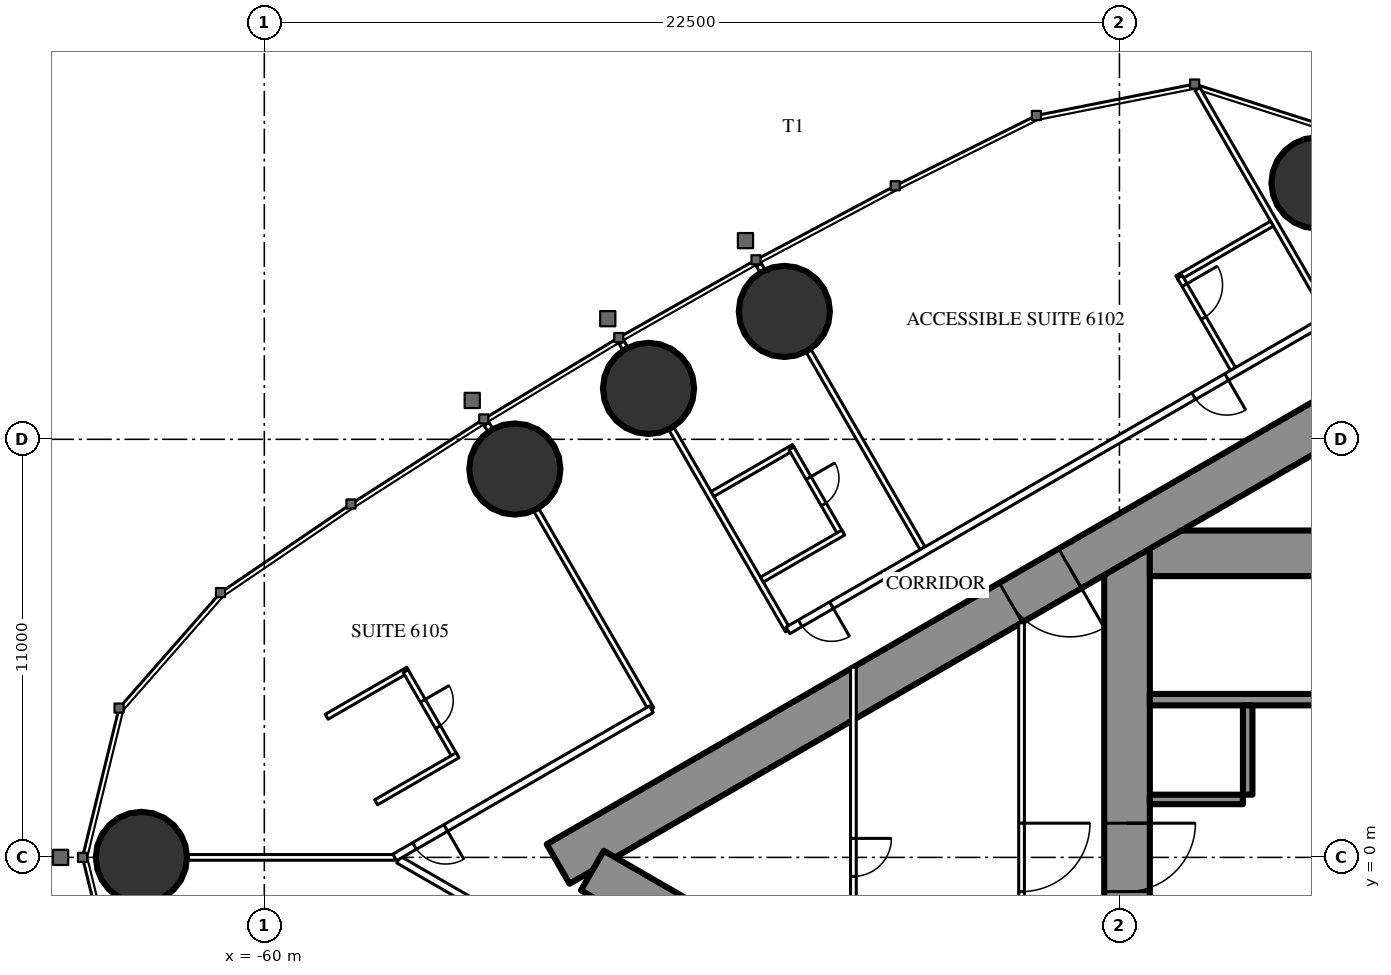
"""IFC4 building model, lengths in metres.
Left out: names, types, materials, properties, quantities, classifications, styles, units other than length and angle.
Written with IfcOpenShell. Run it as: python <this file> out.ifc"""

import sys

from ifc_helpers import new_model, si_unit, direction, frame, frame_2d, origin, origin_2d, place, context, subcontext, project, spatial, rectangle, circle, extrude, element, fill, save


model = new_model("IFC4")
c1 = context("Model", 3, precision=1e-05, world=origin(), true_north=direction((0.0, 1.0)))
c2 = subcontext(c1, "Body", "Model", "MODEL_VIEW")
j1 = project(units=[si_unit("LENGTHUNIT", "METRE"), si_unit("PLANEANGLEUNIT", "RADIAN")], contexts=[c1])
p1 = place(None, origin())
s1 = spatial("IfcSite", under=j1, at=p1, CompositionType="ELEMENT")
p2 = place(p1, origin())
s2 = spatial("IfcBuilding", under=s1, at=p2, CompositionType="ELEMENT")
p3 = place(p2, frame((0.0, 0.0, 229.7)))
s3 = spatial("IfcBuildingStorey", under=s2, at=p3, CompositionType="ELEMENT", Elevation=229.7)
for number, where, z_axis, x_axis in (
    (1, (-63.234, 0.0, 0.0), (0.0, 0.0, 1.0), (1.0, 0.0, 0.0)),
    (2, (-32.301, 17.745, 0.0), (0.0, 0.0, 1.0), (1.0, 0.0, 0.0)),
    (3, (-46.317, 14.365, 0.0), (0.0, 0.0, 1.0), (1.0, 0.0, 0.0)),
    (4, (-49.89, 12.34, 0.0), (0.0, 0.0, 1.0), (1.0, 0.0, 0.0)),
    (5, (-53.408, 10.219, 0.0), (0.0, 0.0, 1.0), (1.0, 0.0, 0.0)),
):
    element("IfcColumn", number, at=place(p3, frame(where, z_axis=z_axis, x_axis=x_axis)), inside=s3, PredefinedType="COLUMN", context=c2, shape_type="SweptSolid", body=[
        extrude(circle(Radius=1.2, at=origin_2d()), origin(), (0.0, 0.0, 1.0), 3.6),
    ])
p4 = place(p3, frame((-37.3, 8.6, 0.0), z_axis=(0.0, 0.0, 1.0), x_axis=(0.0, -1.0, 0.0)))
e6 = element("IfcWall", 6, at=p4, inside=s3, PredefinedType="SHEAR", context=c2, shape_type="SweptSolid", body=[
    extrude(rectangle(XDim=17.2, YDim=1.2, at=frame_2d((8.6, 0.0))), origin(), (0.0, 0.0, 1.0), 3.6),
])
p5 = place(p4, frame((7.7, 0.0, 0.0)))
e7 = element("IfcOpeningElement", 7, at=p5, cuts=e6, PredefinedType="OPENING", context=c2, shape_type="SweptSolid", body=[
    extrude(rectangle(XDim=1.8, YDim=2.2, at=frame_2d((0.9, 1.1))), frame((0.0, 0.61, 0.0), z_axis=(0.0, -1.0, 0.0), x_axis=(1.0, 0.0, 0.0)), (0.0, 0.0, 1.0), 1.22),
])
p6 = place(p3, frame((-28.3, 8.0, 0.0), z_axis=(0.0, 0.0, 1.0), x_axis=(-1.0, 0.0, 0.0)))
e8 = element("IfcWall", 8, at=p6, inside=s3, PredefinedType="SHEAR", context=c2, shape_type="SweptSolid", body=[
    extrude(rectangle(XDim=8.4, YDim=1.2, at=frame_2d((4.2, 0.0))), origin(), (0.0, 0.0, 1.0), 3.6),
])
p7 = place(p6, frame((0.25, 0.0, 0.0)))
e9 = element("IfcOpeningElement", 9, at=p7, cuts=e8, PredefinedType="OPENING", context=c2, shape_type="SweptSolid", body=[
    extrude(rectangle(XDim=1.0, YDim=2.2, at=frame_2d((0.5, 1.1))), frame((0.0, 0.61, 0.0), z_axis=(0.0, -1.0, 0.0), x_axis=(1.0, 0.0, 0.0)), (0.0, 0.0, 1.0), 1.22),
])
p8 = place(p3, frame((-28.3, 4.15, 0.0), z_axis=(0.0, 0.0, 1.0), x_axis=(-1.0, 0.0, 0.0)))
e10 = element("IfcWall", 10, at=p8, inside=s3, PredefinedType="SHEAR", context=c2, shape_type="SweptSolid", body=[
    extrude(rectangle(XDim=8.4, YDim=0.3, at=frame_2d((4.2, 0.0))), origin(), (0.0, 0.0, 1.0), 3.6),
])
p9 = place(p3, frame((-34.125, 4.0, 0.0), z_axis=(0.0, 0.0, 1.0), x_axis=(0.0, -1.0, 0.0)))
e11 = element("IfcWall", 11, at=p9, inside=s3, PredefinedType="SHEAR", context=c2, shape_type="SweptSolid", body=[
    extrude(rectangle(XDim=2.35, YDim=0.25, at=frame_2d((1.175, 0.0))), origin(), (0.0, 0.0, 1.0), 3.6),
])
p10 = place(p3, frame((-34.25, 1.525, 0.0), z_axis=(0.0, 0.0, 1.0), x_axis=(-1.0, 0.0, 0.0)))
e12 = element("IfcWall", 12, at=p10, inside=s3, PredefinedType="SHEAR", context=c2, shape_type="SweptSolid", body=[
    extrude(rectangle(XDim=2.45, YDim=0.25, at=frame_2d((1.225, 0.0))), origin(), (0.0, 0.0, 1.0), 3.6),
])
p11 = place(p3, frame((-27.2, 14.3, 0.0), z_axis=(0.0, 0.0, 1.0), x_axis=(-0.866026593062, -0.499997940104, 0.0)))
e13 = element("IfcWall", 13, at=p11, inside=s3, PredefinedType="SHEAR", context=c2, shape_type="SweptSolid", body=[
    extrude(rectangle(XDim=28.946, YDim=1.2, at=frame_2d((14.473, 0.0))), origin(), (0.0, 0.0, 1.0), 3.6),
])
p12 = place(p11, frame((4.6, 0.0, 0.0)))
e14 = element("IfcOpeningElement", 14, at=p12, cuts=e13, PredefinedType="OPENING", context=c2, shape_type="SweptSolid", body=[
    extrude(rectangle(XDim=1.0, YDim=2.2, at=frame_2d((0.5, 1.1))), frame((0.0, 0.61, 0.0), z_axis=(0.0, -1.0, 0.0), x_axis=(1.0, 0.0, 0.0)), (0.0, 0.0, 1.0), 1.22),
])
p13 = place(p11, frame((13.395, 0.0, 0.0)))
e15 = element("IfcOpeningElement", 15, at=p13, cuts=e13, PredefinedType="OPENING", context=c2, shape_type="SweptSolid", body=[
    extrude(rectangle(XDim=1.8, YDim=2.2, at=frame_2d((0.9, 1.1))), frame((0.0, 0.61, 0.0), z_axis=(0.0, -1.0, 0.0), x_axis=(1.0, 0.0, 0.0)), (0.0, 0.0, 1.0), 1.22),
])
p14 = place(p3, frame((-27.2, -14.3, 0.0), z_axis=(0.0, 0.0, 1.0), x_axis=(-0.866024021859, 0.500002393557, 0.0)))
e16 = element("IfcWall", 16, at=p14, inside=s3, PredefinedType="SHEAR", context=c2, shape_type="SweptSolid", body=[
    extrude(rectangle(XDim=27.907, YDim=1.2, at=frame_2d((13.954, 0.0))), origin(), (0.0, 0.0, 1.0), 3.6),
])
p15 = place(p14, frame((4.6, 0.0, 0.0)))
e17 = element("IfcOpeningElement", 17, at=p15, cuts=e16, PredefinedType="OPENING", context=c2, shape_type="SweptSolid", body=[
    extrude(rectangle(XDim=1.0, YDim=2.2, at=frame_2d((0.5, 1.1))), frame((0.0, 0.61, 0.0), z_axis=(0.0, -1.0, 0.0), x_axis=(1.0, 0.0, 0.0)), (0.0, 0.0, 1.0), 1.22),
])
p16 = place(p14, frame((13.395, 0.0, 0.0)))
e18 = element("IfcOpeningElement", 18, at=p16, cuts=e16, PredefinedType="OPENING", context=c2, shape_type="SweptSolid", body=[
    extrude(rectangle(XDim=1.8, YDim=2.2, at=frame_2d((0.9, 1.1))), frame((0.0, 0.61, 0.0), z_axis=(0.0, -1.0, 0.0), x_axis=(1.0, 0.0, 0.0)), (0.0, 0.0, 1.0), 1.22),
])
p17 = place(p3, frame((-32.022, 14.287, 0.0), z_axis=(0.0, 0.0, 1.0), x_axis=(-0.50000019414, 0.866025291697, 0.0)))
e19 = element("IfcWall", 19, at=p17, inside=s3, PredefinedType="PARTITIONING", context=c2, shape_type="SweptSolid", body=[
    extrude(rectangle(XDim=6.848, YDim=0.15, at=frame_2d((3.424, 0.0))), origin(), (0.0, 0.0, 1.0), 3.35),
])
p18 = place(p3, frame((-42.68, 8.134, 0.0), z_axis=(0.0, 0.0, 1.0), x_axis=(-0.499984479505, 0.866034364361, 0.0)))
e20 = element("IfcWall", 20, at=p18, inside=s3, PredefinedType="PARTITIONING", context=c2, shape_type="SweptSolid", body=[
    extrude(rectangle(XDim=5.995, YDim=0.15, at=frame_2d((2.998, 0.0))), origin(), (0.0, 0.0, 1.0), 2.45),
])
p19 = place(p3, frame((-46.898, 15.439, 0.0), z_axis=(0.0, 0.0, 1.0), x_axis=(-0.500232303069, 0.865891241997, 0.0)))
e21 = element("IfcWall", 21, at=p19, inside=s3, PredefinedType="PARTITIONING", context=c2, shape_type="SweptSolid", body=[
    extrude(rectangle(XDim=0.18, YDim=0.15, at=frame_2d((0.09, 0.0))), origin(), (0.0, 0.0, 1.0), 2.45),
])
p20 = place(p3, frame((-46.224, 5.972, 0.0), z_axis=(0.0, 0.0, 1.0), x_axis=(-0.500021351822, 0.866013075953, 0.0)))
e22 = element("IfcWall", 22, at=p20, inside=s3, PredefinedType="PARTITIONING", context=c2, shape_type="SweptSolid", body=[
    extrude(rectangle(XDim=6.128, YDim=0.15, at=frame_2d((3.064, 0.0))), origin(), (0.0, 0.0, 1.0), 2.45),
])
p21 = place(p3, frame((-50.508, 13.392, 0.0), z_axis=(0.0, 0.0, 1.0), x_axis=(-0.499644091975, 0.866230789891, 0.0)))
e23 = element("IfcWall", 23, at=p21, inside=s3, PredefinedType="PARTITIONING", context=c2, shape_type="SweptSolid", body=[
    extrude(rectangle(XDim=0.18, YDim=0.15, at=frame_2d((0.09, 0.0))), origin(), (0.0, 0.0, 1.0), 2.45),
])
p22 = place(p3, frame((-49.816, 3.898, 0.0), z_axis=(0.0, 0.0, 1.0), x_axis=(-0.500001913541, 0.866024298998, 0.0)))
e24 = element("IfcWall", 24, at=p22, inside=s3, PredefinedType="PARTITIONING", context=c2, shape_type="SweptSolid", body=[
    extrude(rectangle(XDim=6.05, YDim=0.15, at=frame_2d((3.025, 0.0))), origin(), (0.0, 0.0, 1.0), 2.45),
])
p23 = place(p3, frame((-54.061, 11.25, 0.0), z_axis=(0.0, 0.0, 1.0), x_axis=(-0.500391173478, 0.865799441849, 0.0)))
e25 = element("IfcWall", 25, at=p23, inside=s3, PredefinedType="PARTITIONING", context=c2, shape_type="SweptSolid", body=[
    extrude(rectangle(XDim=0.179, YDim=0.15, at=frame_2d((0.089, 0.0))), origin(), (0.0, 0.0, 1.0), 2.45),
])
p24 = place(p3, frame((-56.568, 0.0, 0.0), z_axis=(0.0, 0.0, 1.0), x_axis=(-1.0, 0.0, 0.0)))
e26 = element("IfcWall", 26, at=p24, inside=s3, PredefinedType="PARTITIONING", context=c2, shape_type="SweptSolid", body=[
    extrude(rectangle(XDim=5.446, YDim=0.15, at=frame_2d((2.723, 0.0))), origin(), (0.0, 0.0, 1.0), 2.45),
])
p25 = place(p3, frame((-44.715, -6.844, 0.0), z_axis=(0.0, 0.0, 1.0), x_axis=(-0.866025261224, 0.500000246922, 0.0)))
e27 = element("IfcWall", 27, at=p25, inside=s3, PredefinedType="PARTITIONING", context=c2, shape_type="SweptSolid", body=[
    extrude(rectangle(XDim=13.567, YDim=0.2, at=frame_2d((6.783, 0.0))), origin(), (0.0, 0.0, 1.0), 3.35),
])
p26 = place(p25, frame((6.266, 0.0, 0.0)))
e28 = element("IfcOpeningElement", 28, at=p26, cuts=e27, PredefinedType="OPENING", context=c2, shape_type="SweptSolid", body=[
    extrude(rectangle(XDim=0.95, YDim=2.2, at=frame_2d((0.475, 1.1))), frame((0.0, 0.11, 0.0), z_axis=(0.0, -1.0, 0.0), x_axis=(1.0, 0.0, 0.0)), (0.0, 0.0, 1.0), 0.22),
])
p27 = place(p25, frame((4.565, 0.0, 0.0)))
e29 = element("IfcOpeningElement", 29, at=p27, cuts=e27, PredefinedType="OPENING", context=c2, shape_type="SweptSolid", body=[
    extrude(rectangle(XDim=0.95, YDim=2.2, at=frame_2d((0.475, 1.1))), frame((0.0, 0.11, 0.0), z_axis=(0.0, -1.0, 0.0), x_axis=(1.0, 0.0, 0.0)), (0.0, 0.0, 1.0), 0.22),
])
p28 = place(p25, frame((0.5, 0.0, 0.0)))
e30 = element("IfcOpeningElement", 30, at=p28, cuts=e27, PredefinedType="OPENING", context=c2, shape_type="SweptSolid", body=[
    extrude(rectangle(XDim=0.967, YDim=2.2, at=frame_2d((0.483, 1.1))), frame((0.0, 0.11, 0.0), z_axis=(0.0, -1.0, 0.0), x_axis=(1.0, 0.0, 0.0)), (0.0, 0.0, 1.0), 0.22),
])
p29 = place(p3, frame((-33.487, 16.675, 0.0), z_axis=(0.0, 0.0, 1.0), x_axis=(-0.866039941686, -0.499974818771, 0.0)))
e31 = element("IfcWall", 31, at=p29, inside=s3, PredefinedType="PARTITIONING", context=c2, shape_type="SweptSolid", body=[
    extrude(rectangle(XDim=2.875, YDim=0.15, at=frame_2d((1.438, 0.0))), origin(), (0.0, 0.0, 1.0), 3.35),
])
p30 = place(p3, frame((-34.511, 12.85, 0.0), z_axis=(0.0, 0.0, 1.0), x_axis=(-0.500011755427, 0.866018616679, 0.0)))
e32 = element("IfcWall", 32, at=p30, inside=s3, PredefinedType="PARTITIONING", context=c2, shape_type="SweptSolid", body=[
    extrude(rectangle(XDim=2.8, YDim=0.15, at=frame_2d((1.4, 0.0))), origin(), (0.0, 0.0, 1.0), 3.35),
])
p31 = place(p30, frame((1.55, 0.0, 0.0)))
e33 = element("IfcOpeningElement", 33, at=p31, cuts=e32, PredefinedType="OPENING", context=c2, shape_type="SweptSolid", body=[
    extrude(rectangle(XDim=1.0, YDim=2.2, at=frame_2d((0.5, 1.1))), frame((0.0, 0.085, 0.0), z_axis=(0.0, -1.0, 0.0), x_axis=(1.0, 0.0, 0.0)), (0.0, 0.0, 1.0), 0.17),
])
p32 = place(p3, frame((-46.065, 10.798, 0.0), z_axis=(0.0, 0.0, 1.0), x_axis=(-0.866031185235, -0.4999899861, 0.0)))
e34 = element("IfcWall", 34, at=p32, inside=s3, PredefinedType="PARTITIONING", context=c2, shape_type="SweptSolid", body=[
    extrude(rectangle(XDim=2.475, YDim=0.15, at=frame_2d((1.238, 0.0))), origin(), (0.0, 0.0, 1.0), 3.35),
])
p33 = place(p3, frame((-44.83, 8.509, 0.0), z_axis=(0.0, 0.0, 1.0), x_axis=(-0.499936506574, 0.866062058628, 0.0)))
e35 = element("IfcWall", 35, at=p33, inside=s3, PredefinedType="PARTITIONING", context=c2, shape_type="SweptSolid", body=[
    extrude(rectangle(XDim=2.6, YDim=0.15, at=frame_2d((1.3, 0.0))), origin(), (0.0, 0.0, 1.0), 3.35),
])
p34 = place(p33, frame((0.9, 0.0, 0.0)))
e36 = element("IfcOpeningElement", 36, at=p34, cuts=e35, PredefinedType="OPENING", context=c2, shape_type="SweptSolid", body=[
    extrude(rectangle(XDim=0.8, YDim=2.2, at=frame_2d((0.4, 1.1))), frame((0.0, 0.085, 0.0), z_axis=(0.0, -1.0, 0.0), x_axis=(1.0, 0.0, 0.0)), (0.0, 0.0, 1.0), 0.17),
])
for number, where, z_axis, x_axis in (
    (37, (-44.765, 8.546, 0.0), (0.0, 0.0, 1.0), (-0.866, -0.5, 0.0)),
    (38, (-56.215, 4.938, 0.0), (0.0, 0.0, 1.0), (-0.866, -0.5, 0.0)),
):
    element("IfcWall", number, at=place(p3, frame(where, z_axis=z_axis, x_axis=x_axis)), inside=s3, PredefinedType="PARTITIONING", context=c2, shape_type="SweptSolid", body=[
        extrude(rectangle(XDim=2.475, YDim=0.15, at=frame_2d((1.237, 0.0))), origin(), (0.0, 0.0, 1.0), 3.35),
    ])
p35 = place(p3, frame((-54.98, 2.649, 0.0), z_axis=(0.0, 0.0, 1.0), x_axis=(-0.500006934395, 0.866021400173, 0.0)))
e39 = element("IfcWall", 39, at=p35, inside=s3, PredefinedType="PARTITIONING", context=c2, shape_type="SweptSolid", body=[
    extrude(rectangle(XDim=2.6, YDim=0.15, at=frame_2d((1.3, 0.0))), origin(), (0.0, 0.0, 1.0), 3.35),
])
p36 = place(p35, frame((0.9, 0.0, 0.0)))
e40 = element("IfcOpeningElement", 40, at=p36, cuts=e39, PredefinedType="OPENING", context=c2, shape_type="SweptSolid", body=[
    extrude(rectangle(XDim=0.8, YDim=2.2, at=frame_2d((0.4, 1.1))), frame((0.0, 0.085, 0.0), z_axis=(0.0, -1.0, 0.0), x_axis=(1.0, 0.0, 0.0)), (0.0, 0.0, 1.0), 0.17),
])
p37 = place(p3, frame((-54.915, 2.687, 0.0), z_axis=(0.0, 0.0, 1.0), x_axis=(-0.866006523861, -0.500032699561, 0.0)))
e41 = element("IfcWall", 41, at=p37, inside=s3, PredefinedType="PARTITIONING", context=c2, shape_type="SweptSolid", body=[
    extrude(rectangle(XDim=2.475, YDim=0.15, at=frame_2d((1.237, 0.0))), origin(), (0.0, 0.0, 1.0), 3.35),
])
p38 = place(p3, frame((-28.737, 16.068, 0.0), z_axis=(0.0, 0.0, 1.0), x_axis=(-0.866023901326, -0.500002602325, 0.0)))
e42 = element("IfcWall", 42, at=p38, inside=s3, PredefinedType="PARTITIONING", context=c2, shape_type="SweptSolid", body=[
    extrude(rectangle(XDim=20.192, YDim=0.2, at=frame_2d((10.096, 0.0))), origin(), (0.0, 0.0, 1.0), 3.35),
])
p39 = place(p38, frame((1.08, 0.0, 0.0)))
e43 = element("IfcOpeningElement", 43, at=p39, cuts=e42, PredefinedType="OPENING", context=c2, shape_type="SweptSolid", body=[
    extrude(rectangle(XDim=1.8, YDim=2.04, at=frame_2d((0.9, 1.02))), frame((0.0, 0.11, 0.0), z_axis=(0.0, -1.0, 0.0), x_axis=(1.0, 0.0, 0.0)), (0.0, 0.0, 1.0), 0.22),
])
p40 = place(p38, frame((6.86, 0.0, 0.0)))
e44 = element("IfcOpeningElement", 44, at=p40, cuts=e42, PredefinedType="OPENING", context=c2, shape_type="SweptSolid", body=[
    extrude(rectangle(XDim=1.0, YDim=2.2, at=frame_2d((0.5, 1.1))), frame((0.0, 0.11, 0.0), z_axis=(0.0, -1.0, 0.0), x_axis=(1.0, 0.0, 0.0)), (0.0, 0.0, 1.0), 0.22),
])
p41 = place(p38, frame((18.867, 0.0, 0.0)))
e45 = element("IfcOpeningElement", 45, at=p41, cuts=e42, PredefinedType="OPENING", context=c2, shape_type="SweptSolid", body=[
    extrude(rectangle(XDim=0.95, YDim=2.2, at=frame_2d((0.475, 1.1))), frame((0.0, 0.11, 0.0), z_axis=(0.0, -1.0, 0.0), x_axis=(1.0, 0.0, 0.0)), (0.0, 0.0, 1.0), 0.22),
])
p42 = place(p3, frame((-49.816, 3.898, 0.0), z_axis=(0.0, 0.0, 1.0), x_axis=(-0.866028102716, -0.499995325284, 0.0)))
e46 = element("IfcWall", 46, at=p42, inside=s3, PredefinedType="PARTITIONING", context=c2, shape_type="SweptSolid", body=[
    extrude(rectangle(XDim=7.796, YDim=0.2, at=frame_2d((3.898, 0.0))), origin(), (0.0, 0.0, 1.0), 3.35),
])
p43 = place(p42, frame((6.246, 0.0, 0.0)))
e47 = element("IfcOpeningElement", 47, at=p43, cuts=e46, PredefinedType="OPENING", context=c2, shape_type="SweptSolid", body=[
    extrude(rectangle(XDim=0.95, YDim=2.2, at=frame_2d((0.475, 1.1))), frame((0.0, 0.11, 0.0), z_axis=(0.0, -1.0, 0.0), x_axis=(1.0, 0.0, 0.0)), (0.0, 0.0, 1.0), 0.22),
])
p44 = place(p3, frame((-40.075, 6.174, 0.0), z_axis=(0.0, 0.0, 1.0), x_axis=(0.0, -1.0, 0.0)))
e48 = element("IfcWall", 48, at=p44, inside=s3, PredefinedType="PARTITIONING", context=c2, shape_type="SweptSolid", body=[
    extrude(rectangle(XDim=12.348, YDim=0.15, at=frame_2d((6.174, 0.0))), origin(), (0.0, 0.0, 1.0), 3.35),
])
p45 = place(p44, frame((5.274, 0.0, 0.0)))
e49 = element("IfcOpeningElement", 49, at=p45, cuts=e48, PredefinedType="OPENING", context=c2, shape_type="SweptSolid", body=[
    extrude(rectangle(XDim=1.8, YDim=2.2, at=frame_2d((0.9, 1.1))), frame((0.0, 0.085, 0.0), z_axis=(0.0, -1.0, 0.0), x_axis=(1.0, 0.0, 0.0)), (0.0, 0.0, 1.0), 0.17),
])
p46 = place(p3, frame((-44.5, 5.005, 0.0), z_axis=(0.0, 0.0, 1.0), x_axis=(0.0, -1.0, 0.0)))
e50 = element("IfcWall", 50, at=p46, inside=s3, PredefinedType="PARTITIONING", context=c2, shape_type="SweptSolid", body=[
    extrude(rectangle(XDim=10.009, YDim=0.15, at=frame_2d((5.005, 0.0))), origin(), (0.0, 0.0, 1.0), 2.5),
])
p47 = place(p46, frame((4.505, 0.0, 0.0)))
e51 = element("IfcOpeningElement", 51, at=p47, cuts=e50, PredefinedType="OPENING", context=c2, shape_type="SweptSolid", body=[
    extrude(rectangle(XDim=1.0, YDim=2.2, at=frame_2d((0.5, 1.1))), frame((0.0, 0.085, 0.0), z_axis=(0.0, -1.0, 0.0), x_axis=(1.0, 0.0, 0.0)), (0.0, 0.0, 1.0), 0.17),
])
p48 = place(p31, origin())
e52 = element("IfcDoor", 52, at=p48, inside=s3, OperationType="SINGLE_SWING_RIGHT", PredefinedType="DOOR", context=c2, shape_type="SweptSolid", body=[
    extrude(rectangle(XDim=1.0, YDim=2.2, at=frame_2d((0.5, 1.1))), frame((0.0, 0.025, 0.0), z_axis=(0.0, -1.0, 0.0), x_axis=(1.0, 0.0, 0.0)), (0.0, 0.0, 1.0), 0.05),
])
fill(e33, e52)
p49 = place(p40, origin())
e53 = element("IfcDoor", 53, at=p49, inside=s3, OperationType="SINGLE_SWING_LEFT", PredefinedType="DOOR", context=c2, shape_type="SweptSolid", body=[
    extrude(rectangle(XDim=1.0, YDim=2.2, at=frame_2d((0.5, 1.1))), frame((0.0, 0.025, 0.0), z_axis=(0.0, -1.0, 0.0), x_axis=(1.0, 0.0, 0.0)), (0.0, 0.0, 1.0), 0.05),
])
fill(e44, e53)
p50 = place(p34, origin())
e54 = element("IfcDoor", 54, at=p50, inside=s3, OperationType="SINGLE_SWING_RIGHT", PredefinedType="DOOR", context=c2, shape_type="SweptSolid", body=[
    extrude(rectangle(XDim=0.8, YDim=2.2, at=frame_2d((0.4, 1.1))), frame((0.0, 0.025, 0.0), z_axis=(0.0, -1.0, 0.0), x_axis=(1.0, 0.0, 0.0)), (0.0, 0.0, 1.0), 0.05),
])
fill(e36, e54)
p51 = place(p41, origin())
e55 = element("IfcDoor", 55, at=p51, inside=s3, OperationType="SINGLE_SWING_LEFT", PredefinedType="DOOR", context=c2, shape_type="SweptSolid", body=[
    extrude(rectangle(XDim=0.95, YDim=2.2, at=frame_2d((0.475, 1.1))), frame((0.0, 0.025, 0.0), z_axis=(0.0, -1.0, 0.0), x_axis=(1.0, 0.0, 0.0)), (0.0, 0.0, 1.0), 0.05),
])
fill(e45, e55)
p52 = place(p36, origin())
e56 = element("IfcDoor", 56, at=p52, inside=s3, OperationType="SINGLE_SWING_RIGHT", PredefinedType="DOOR", context=c2, shape_type="SweptSolid", body=[
    extrude(rectangle(XDim=0.8, YDim=2.2, at=frame_2d((0.4, 1.1))), frame((0.0, 0.025, 0.0), z_axis=(0.0, -1.0, 0.0), x_axis=(1.0, 0.0, 0.0)), (0.0, 0.0, 1.0), 0.05),
])
fill(e40, e56)
p53 = place(p43, origin())
e57 = element("IfcDoor", 57, at=p53, inside=s3, OperationType="SINGLE_SWING_LEFT", PredefinedType="DOOR", context=c2, shape_type="SweptSolid", body=[
    extrude(rectangle(XDim=0.95, YDim=2.2, at=frame_2d((0.475, 1.1))), frame((0.0, 0.025, 0.0), z_axis=(0.0, -1.0, 0.0), x_axis=(1.0, 0.0, 0.0)), (0.0, 0.0, 1.0), 0.05),
])
fill(e47, e57)
p54 = place(p45, origin())
e58 = element("IfcDoor", 58, at=p54, inside=s3, OperationType="DOUBLE_DOOR_SINGLE_SWING", PredefinedType="DOOR", context=c2, shape_type="SweptSolid", body=[
    extrude(rectangle(XDim=1.8, YDim=2.2, at=frame_2d((0.9, 1.1))), frame((0.0, 0.025, 0.0), z_axis=(0.0, -1.0, 0.0), x_axis=(1.0, 0.0, 0.0)), (0.0, 0.0, 1.0), 0.05),
])
fill(e49, e58)
p55 = place(p47, origin())
e59 = element("IfcDoor", 59, at=p55, inside=s3, OperationType="SINGLE_SWING_LEFT", PredefinedType="DOOR", context=c2, shape_type="SweptSolid", body=[
    extrude(rectangle(XDim=1.0, YDim=2.2, at=frame_2d((0.5, 1.1))), frame((0.0, 0.025, 0.0), z_axis=(0.0, -1.0, 0.0), x_axis=(1.0, 0.0, 0.0)), (0.0, 0.0, 1.0), 0.05),
])
fill(e51, e59)
p56 = place(p13, origin())
e60 = element("IfcDoor", 60, at=p56, inside=s3, OperationType="DOUBLE_DOOR_SINGLE_SWING", PredefinedType="DOOR", context=c2, shape_type="SweptSolid", body=[
    extrude(rectangle(XDim=1.8, YDim=2.2, at=frame_2d((0.9, 1.1))), frame((0.0, 0.025, 0.0), z_axis=(0.0, -1.0, 0.0), x_axis=(1.0, 0.0, 0.0)), (0.0, 0.0, 1.0), 0.05),
])
fill(e15, e60)
p57 = place(p5, origin())
e61 = element("IfcDoor", 61, at=p57, inside=s3, OperationType="DOUBLE_DOOR_SINGLE_SWING", PredefinedType="DOOR", context=c2, shape_type="SweptSolid", body=[
    extrude(rectangle(XDim=1.8, YDim=2.2, at=frame_2d((0.9, 1.1))), frame((0.0, 0.025, 0.0), z_axis=(0.0, -1.0, 0.0), x_axis=(1.0, 0.0, 0.0)), (0.0, 0.0, 1.0), 0.05),
])
fill(e7, e61)
save(model, sys.argv[1])
